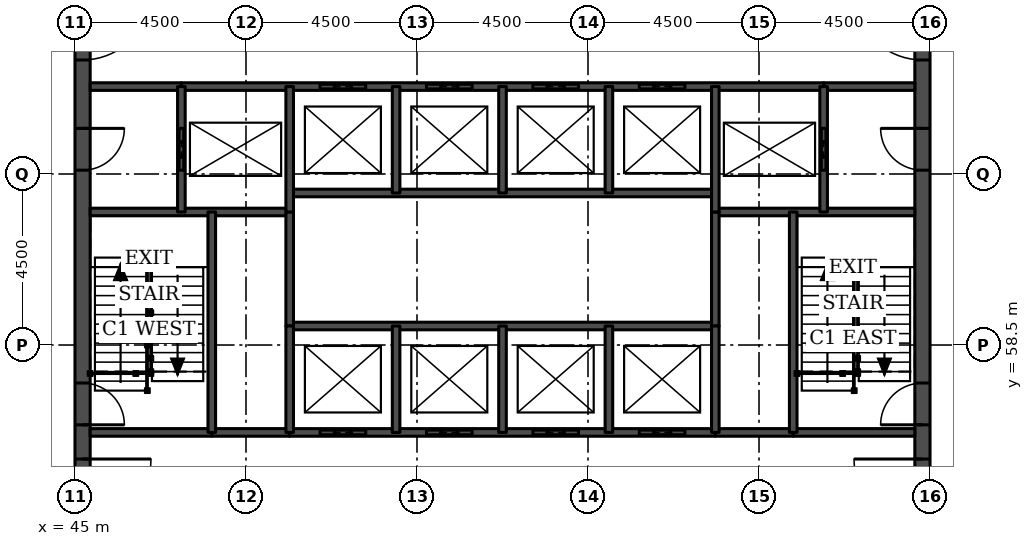
"""IFC4 building model, lengths in metres.
Left out: names, types, materials, properties, quantities, classifications, styles, units other than length and angle.
Written with IfcOpenShell. Run it as: python <this file> out.ifc"""

import sys

from ifc_helpers import new_model, si_unit, direction, frame, frame_2d, origin, place, context, subcontext, project, spatial, rectangle, extrude, element, fill, save


model = new_model("IFC4")
c1 = context("Model", 3, precision=1e-05, world=origin(), true_north=direction((0.0, 1.0)))
c2 = subcontext(c1, "Body", "Model", "MODEL_VIEW")
j1 = project(units=[si_unit("LENGTHUNIT", "METRE"), si_unit("PLANEANGLEUNIT", "RADIAN")], contexts=[c1])
p1 = place(None, origin())
s1 = spatial("IfcSite", under=j1, at=p1, CompositionType="ELEMENT")
p2 = place(p1, origin())
s2 = spatial("IfcBuilding", under=s1, at=p2, CompositionType="ELEMENT")
p3 = place(p2, frame((0.0, 0.0, 169.9)))
s3 = spatial("IfcBuildingStorey", under=s2, at=p3, CompositionType="ELEMENT", Elevation=169.9)
p4 = place(p3, frame((45.2, 49.5, 0.0), z_axis=(0.0, 0.0, 1.0), x_axis=(0.0, 1.0, 0.0)))
e1 = element("IfcWall", 1, at=p4, inside=s3, PredefinedType="SHEAR", context=c2, shape_type="SweptSolid", body=[
    extrude(rectangle(XDim=22.5, YDim=0.4, at=frame_2d((11.25, 0.0))), origin(), (0.0, 0.0, 1.0), 3.7),
])
p5 = place(p4, frame((4.2, 0.0, 0.0)))
e2 = element("IfcOpeningElement", 2, at=p5, cuts=e1, PredefinedType="OPENING", context=c2, shape_type="SweptSolid", body=[
    extrude(rectangle(XDim=1.8, YDim=2.1, at=frame_2d((0.9, 1.05))), frame((0.0, 0.21, 0.0), z_axis=(0.0, -1.0, 0.0), x_axis=(1.0, 0.0, 0.0)), (0.0, 0.0, 1.0), 0.42),
])
p6 = place(p4, frame((6.9, 0.0, 0.0)))
e3 = element("IfcOpeningElement", 3, at=p6, cuts=e1, PredefinedType="OPENING", context=c2, shape_type="SweptSolid", body=[
    extrude(rectangle(XDim=1.1, YDim=2.1, at=frame_2d((0.55, 1.05))), frame((0.0, 0.21, 0.0), z_axis=(0.0, -1.0, 0.0), x_axis=(1.0, 0.0, 0.0)), (0.0, 0.0, 1.0), 0.42),
])
p7 = place(p4, frame((13.6, 0.0, 0.0)))
e4 = element("IfcOpeningElement", 4, at=p7, cuts=e1, PredefinedType="OPENING", context=c2, shape_type="SweptSolid", body=[
    extrude(rectangle(XDim=1.1, YDim=2.1, at=frame_2d((0.55, 1.05))), frame((0.0, 0.21, 0.0), z_axis=(0.0, -1.0, 0.0), x_axis=(1.0, 0.0, 0.0)), (0.0, 0.0, 1.0), 0.42),
])
p8 = place(p4, frame((16.5, 0.0, 0.0)))
e5 = element("IfcOpeningElement", 5, at=p8, cuts=e1, PredefinedType="OPENING", context=c2, shape_type="SweptSolid", body=[
    extrude(rectangle(XDim=1.8, YDim=2.1, at=frame_2d((0.9, 1.05))), frame((0.0, 0.21, 0.0), z_axis=(0.0, -1.0, 0.0), x_axis=(1.0, 0.0, 0.0)), (0.0, 0.0, 1.0), 0.42),
])
p9 = place(p3, frame((67.3, 49.5, 0.0), z_axis=(0.0, 0.0, 1.0), x_axis=(0.0, 1.0, 0.0)))
e6 = element("IfcWall", 6, at=p9, inside=s3, PredefinedType="SHEAR", context=c2, shape_type="SweptSolid", body=[
    extrude(rectangle(XDim=22.5, YDim=0.4, at=frame_2d((11.25, 0.0))), origin(), (0.0, 0.0, 1.0), 3.7),
])
p10 = place(p9, frame((4.2, 0.0, 0.0)))
e7 = element("IfcOpeningElement", 7, at=p10, cuts=e6, PredefinedType="OPENING", context=c2, shape_type="SweptSolid", body=[
    extrude(rectangle(XDim=1.8, YDim=2.1, at=frame_2d((0.9, 1.05))), frame((0.0, 0.21, 0.0), z_axis=(0.0, -1.0, 0.0), x_axis=(1.0, 0.0, 0.0)), (0.0, 0.0, 1.0), 0.42),
])
p11 = place(p9, frame((6.9, 0.0, 0.0)))
e8 = element("IfcOpeningElement", 8, at=p11, cuts=e6, PredefinedType="OPENING", context=c2, shape_type="SweptSolid", body=[
    extrude(rectangle(XDim=1.1, YDim=2.1, at=frame_2d((0.55, 1.05))), frame((0.0, 0.21, 0.0), z_axis=(0.0, -1.0, 0.0), x_axis=(1.0, 0.0, 0.0)), (0.0, 0.0, 1.0), 0.42),
])
p12 = place(p9, frame((13.6, 0.0, 0.0)))
e9 = element("IfcOpeningElement", 9, at=p12, cuts=e6, PredefinedType="OPENING", context=c2, shape_type="SweptSolid", body=[
    extrude(rectangle(XDim=1.1, YDim=2.1, at=frame_2d((0.55, 1.05))), frame((0.0, 0.21, 0.0), z_axis=(0.0, -1.0, 0.0), x_axis=(1.0, 0.0, 0.0)), (0.0, 0.0, 1.0), 0.42),
])
p13 = place(p9, frame((16.5, 0.0, 0.0)))
e10 = element("IfcOpeningElement", 10, at=p13, cuts=e6, PredefinedType="OPENING", context=c2, shape_type="SweptSolid", body=[
    extrude(rectangle(XDim=1.8, YDim=2.1, at=frame_2d((0.9, 1.05))), frame((0.0, 0.21, 0.0), z_axis=(0.0, -1.0, 0.0), x_axis=(1.0, 0.0, 0.0)), (0.0, 0.0, 1.0), 0.42),
])
for number, where, z_axis, x_axis in (
    (11, (48.6, 56.2, 0.0), (0.0, 0.0, 1.0), (1.0, 0.0, 0.0)),
    (12, (61.85, 56.2, 0.0), (0.0, 0.0, 1.0), (1.0, 0.0, 0.0)),
):
    element("IfcWall", number, at=place(p3, frame(where, z_axis=z_axis, x_axis=x_axis)), inside=s3, PredefinedType="SOLIDWALL", context=c2, shape_type="SweptSolid", body=[
        extrude(rectangle(XDim=2.05, YDim=0.2, at=frame_2d((1.025, 0.0))), origin(), (0.0, 0.0, 1.0), 3.55),
    ])
p14 = place(p3, frame((45.4, 56.2, 0.0), z_axis=(0.0, 0.0, 1.0), x_axis=(1.0, 0.0, 0.0)))
e13 = element("IfcWall", 13, at=p14, inside=s3, PredefinedType="SOLIDWALL", context=c2, shape_type="SweptSolid", body=[
    extrude(rectangle(XDim=3.2, YDim=0.2, at=frame_2d((1.6, 0.0))), origin(), (0.0, 0.0, 1.0), 3.55),
])
p15 = place(p3, frame((50.65, 56.2, 0.0), z_axis=(0.0, 0.0, 1.0), x_axis=(1.0, 0.0, 0.0)))
e14 = element("IfcWall", 14, at=p15, inside=s3, PredefinedType="SOLIDWALL", context=c2, shape_type="SweptSolid", body=[
    extrude(rectangle(XDim=11.2, YDim=0.2, at=frame_2d((5.6, 0.0))), origin(), (0.0, 0.0, 1.0), 3.55),
])
p16 = place(p15, frame((0.8, 0.0, 0.0)))
e15 = element("IfcOpeningElement", 15, at=p16, cuts=e14, PredefinedType="OPENING", context=c2, shape_type="SweptSolid", body=[
    extrude(rectangle(XDim=1.2, YDim=2.1, at=frame_2d((0.6, 1.05))), frame((0.0, 0.11, 0.0), z_axis=(0.0, -1.0, 0.0), x_axis=(1.0, 0.0, 0.0)), (0.0, 0.0, 1.0), 0.22),
])
p17 = place(p15, frame((3.6, 0.0, 0.0)))
e16 = element("IfcOpeningElement", 16, at=p17, cuts=e14, PredefinedType="OPENING", context=c2, shape_type="SweptSolid", body=[
    extrude(rectangle(XDim=1.2, YDim=2.1, at=frame_2d((0.6, 1.05))), frame((0.0, 0.11, 0.0), z_axis=(0.0, -1.0, 0.0), x_axis=(1.0, 0.0, 0.0)), (0.0, 0.0, 1.0), 0.22),
])
p18 = place(p15, frame((6.4, 0.0, 0.0)))
e17 = element("IfcOpeningElement", 17, at=p18, cuts=e14, PredefinedType="OPENING", context=c2, shape_type="SweptSolid", body=[
    extrude(rectangle(XDim=1.2, YDim=2.1, at=frame_2d((0.6, 1.05))), frame((0.0, 0.11, 0.0), z_axis=(0.0, -1.0, 0.0), x_axis=(1.0, 0.0, 0.0)), (0.0, 0.0, 1.0), 0.22),
])
p19 = place(p15, frame((9.2, 0.0, 0.0)))
e18 = element("IfcOpeningElement", 18, at=p19, cuts=e14, PredefinedType="OPENING", context=c2, shape_type="SweptSolid", body=[
    extrude(rectangle(XDim=1.2, YDim=2.1, at=frame_2d((0.6, 1.05))), frame((0.0, 0.11, 0.0), z_axis=(0.0, -1.0, 0.0), x_axis=(1.0, 0.0, 0.0)), (0.0, 0.0, 1.0), 0.22),
])
p20 = place(p3, frame((63.9, 56.2, 0.0), z_axis=(0.0, 0.0, 1.0), x_axis=(1.0, 0.0, 0.0)))
e19 = element("IfcWall", 19, at=p20, inside=s3, PredefinedType="SOLIDWALL", context=c2, shape_type="SweptSolid", body=[
    extrude(rectangle(XDim=3.2, YDim=0.2, at=frame_2d((1.6, 0.0))), origin(), (0.0, 0.0, 1.0), 3.55),
])
p21 = place(p3, frame((50.65, 59.0, 0.0), z_axis=(0.0, 0.0, 1.0), x_axis=(1.0, 0.0, 0.0)))
e20 = element("IfcWall", 20, at=p21, inside=s3, PredefinedType="SOLIDWALL", context=c2, shape_type="SweptSolid", body=[
    extrude(rectangle(XDim=11.2, YDim=0.2, at=frame_2d((5.6, 0.0))), origin(), (0.0, 0.0, 1.0), 3.7),
])
for number, where, z_axis, x_axis in (
    (21, (45.4, 62.0, 0.0), (0.0, 0.0, 1.0), (1.0, 0.0, 0.0)),
    (22, (61.85, 62.0, 0.0), (0.0, 0.0, 1.0), (1.0, 0.0, 0.0)),
):
    element("IfcWall", number, at=place(p3, frame(where, z_axis=z_axis, x_axis=x_axis)), inside=s3, PredefinedType="SOLIDWALL", context=c2, shape_type="SweptSolid", body=[
        extrude(rectangle(XDim=5.25, YDim=0.2, at=frame_2d((2.625, 0.0))), origin(), (0.0, 0.0, 1.0), 3.55),
    ])
p22 = place(p3, frame((50.65, 62.5, 0.0), z_axis=(0.0, 0.0, 1.0), x_axis=(1.0, 0.0, 0.0)))
e23 = element("IfcWall", 23, at=p22, inside=s3, PredefinedType="SOLIDWALL", context=c2, shape_type="SweptSolid", body=[
    extrude(rectangle(XDim=11.2, YDim=0.2, at=frame_2d((5.6, 0.0))), origin(), (0.0, 0.0, 1.0), 3.7),
])
for number, where, z_axis, x_axis in (
    (24, (45.4, 65.3, 0.0), (0.0, 0.0, 1.0), (1.0, 0.0, 0.0)),
    (25, (64.7, 65.3, 0.0), (0.0, 0.0, 1.0), (1.0, 0.0, 0.0)),
):
    element("IfcWall", number, at=place(p3, frame(where, z_axis=z_axis, x_axis=x_axis)), inside=s3, PredefinedType="SOLIDWALL", context=c2, shape_type="SweptSolid", body=[
        extrude(rectangle(XDim=2.4, YDim=0.2, at=frame_2d((1.2, 0.0))), origin(), (0.0, 0.0, 1.0), 3.55),
    ])
p23 = place(p3, frame((47.8, 65.3, 0.0), z_axis=(0.0, 0.0, 1.0), x_axis=(1.0, 0.0, 0.0)))
e26 = element("IfcWall", 26, at=p23, inside=s3, PredefinedType="SOLIDWALL", context=c2, shape_type="SweptSolid", body=[
    extrude(rectangle(XDim=16.9, YDim=0.2, at=frame_2d((8.45, 0.0))), origin(), (0.0, 0.0, 1.0), 3.55),
])
p24 = place(p23, frame((3.65, 0.0, 0.0)))
e27 = element("IfcOpeningElement", 27, at=p24, cuts=e26, PredefinedType="OPENING", context=c2, shape_type="SweptSolid", body=[
    extrude(rectangle(XDim=1.2, YDim=2.1, at=frame_2d((0.6, 1.05))), frame((0.0, 0.11, 0.0), z_axis=(0.0, -1.0, 0.0), x_axis=(1.0, 0.0, 0.0)), (0.0, 0.0, 1.0), 0.22),
])
p25 = place(p23, frame((6.45, 0.0, 0.0)))
e28 = element("IfcOpeningElement", 28, at=p25, cuts=e26, PredefinedType="OPENING", context=c2, shape_type="SweptSolid", body=[
    extrude(rectangle(XDim=1.2, YDim=2.1, at=frame_2d((0.6, 1.05))), frame((0.0, 0.11, 0.0), z_axis=(0.0, -1.0, 0.0), x_axis=(1.0, 0.0, 0.0)), (0.0, 0.0, 1.0), 0.22),
])
p26 = place(p23, frame((9.25, 0.0, 0.0)))
e29 = element("IfcOpeningElement", 29, at=p26, cuts=e26, PredefinedType="OPENING", context=c2, shape_type="SweptSolid", body=[
    extrude(rectangle(XDim=1.2, YDim=2.1, at=frame_2d((0.6, 1.05))), frame((0.0, 0.11, 0.0), z_axis=(0.0, -1.0, 0.0), x_axis=(1.0, 0.0, 0.0)), (0.0, 0.0, 1.0), 0.22),
])
p27 = place(p23, frame((12.05, 0.0, 0.0)))
e30 = element("IfcOpeningElement", 30, at=p27, cuts=e26, PredefinedType="OPENING", context=c2, shape_type="SweptSolid", body=[
    extrude(rectangle(XDim=1.2, YDim=2.1, at=frame_2d((0.6, 1.05))), frame((0.0, 0.11, 0.0), z_axis=(0.0, -1.0, 0.0), x_axis=(1.0, 0.0, 0.0)), (0.0, 0.0, 1.0), 0.22),
])
p28 = place(p3, frame((47.8, 62.0, 0.0), z_axis=(0.0, 0.0, 1.0), x_axis=(0.0, 1.0, 0.0)))
e31 = element("IfcWall", 31, at=p28, inside=s3, PredefinedType="SOLIDWALL", context=c2, shape_type="SweptSolid", body=[
    extrude(rectangle(XDim=3.3, YDim=0.2, at=frame_2d((1.65, 0.0))), origin(), (0.0, 0.0, 1.0), 3.55),
])
p29 = place(p28, frame((1.1, 0.0, 0.0)))
e32 = element("IfcOpeningElement", 32, at=p29, cuts=e31, PredefinedType="OPENING", context=c2, shape_type="SweptSolid", body=[
    extrude(rectangle(XDim=1.1, YDim=2.1, at=frame_2d((0.55, 1.05))), frame((0.0, 0.11, 0.0), z_axis=(0.0, -1.0, 0.0), x_axis=(1.0, 0.0, 0.0)), (0.0, 0.0, 1.0), 0.22),
])
p30 = place(p3, frame((48.6, 56.2, 0.0), z_axis=(0.0, 0.0, 1.0), x_axis=(0.0, 1.0, 0.0)))
e33 = element("IfcWall", 33, at=p30, inside=s3, PredefinedType="SOLIDWALL", context=c2, shape_type="SweptSolid", body=[
    extrude(rectangle(XDim=5.8, YDim=0.2, at=frame_2d((2.9, 0.0))), origin(), (0.0, 0.0, 1.0), 3.55),
])
p31 = place(p3, frame((50.65, 59.0, 0.0), z_axis=(0.0, 0.0, 1.0), x_axis=(0.0, 1.0, 0.0)))
e34 = element("IfcWall", 34, at=p31, inside=s3, PredefinedType="SOLIDWALL", context=c2, shape_type="SweptSolid", body=[
    extrude(rectangle(XDim=3.0, YDim=0.2, at=frame_2d((1.5, 0.0))), origin(), (0.0, 0.0, 1.0), 3.7),
])
p32 = place(p3, frame((50.65, 56.2, 0.0), z_axis=(0.0, 0.0, 1.0), x_axis=(0.0, 1.0, 0.0)))
e35 = element("IfcWall", 35, at=p32, inside=s3, PredefinedType="SOLIDWALL", context=c2, shape_type="SweptSolid", body=[
    extrude(rectangle(XDim=2.8, YDim=0.2, at=frame_2d((1.4, 0.0))), origin(), (0.0, 0.0, 1.0), 3.55),
])
p33 = place(p3, frame((50.65, 62.0, 0.0), z_axis=(0.0, 0.0, 1.0), x_axis=(0.0, 1.0, 0.0)))
e36 = element("IfcWall", 36, at=p33, inside=s3, PredefinedType="SOLIDWALL", context=c2, shape_type="SweptSolid", body=[
    extrude(rectangle(XDim=3.3, YDim=0.2, at=frame_2d((1.65, 0.0))), origin(), (0.0, 0.0, 1.0), 3.55),
])
for number, where, z_axis, x_axis in (
    (37, (53.45, 56.2, 0.0), (0.0, 0.0, 1.0), (0.0, 1.0, 0.0)),
    (38, (53.45, 62.5, 0.0), (0.0, 0.0, 1.0), (0.0, 1.0, 0.0)),
    (39, (56.25, 56.2, 0.0), (0.0, 0.0, 1.0), (0.0, 1.0, 0.0)),
    (40, (56.25, 62.5, 0.0), (0.0, 0.0, 1.0), (0.0, 1.0, 0.0)),
    (41, (59.05, 56.2, 0.0), (0.0, 0.0, 1.0), (0.0, 1.0, 0.0)),
    (42, (59.05, 62.5, 0.0), (0.0, 0.0, 1.0), (0.0, 1.0, 0.0)),
):
    element("IfcWall", number, at=place(p3, frame(where, z_axis=z_axis, x_axis=x_axis)), inside=s3, PredefinedType="SOLIDWALL", context=c2, shape_type="SweptSolid", body=[
        extrude(rectangle(XDim=2.8, YDim=0.2, at=frame_2d((1.4, 0.0))), origin(), (0.0, 0.0, 1.0), 3.55),
    ])
p34 = place(p3, frame((61.85, 59.0, 0.0), z_axis=(0.0, 0.0, 1.0), x_axis=(0.0, 1.0, 0.0)))
e43 = element("IfcWall", 43, at=p34, inside=s3, PredefinedType="SOLIDWALL", context=c2, shape_type="SweptSolid", body=[
    extrude(rectangle(XDim=3.0, YDim=0.2, at=frame_2d((1.5, 0.0))), origin(), (0.0, 0.0, 1.0), 3.7),
])
p35 = place(p3, frame((61.85, 56.2, 0.0), z_axis=(0.0, 0.0, 1.0), x_axis=(0.0, 1.0, 0.0)))
e44 = element("IfcWall", 44, at=p35, inside=s3, PredefinedType="SOLIDWALL", context=c2, shape_type="SweptSolid", body=[
    extrude(rectangle(XDim=2.8, YDim=0.2, at=frame_2d((1.4, 0.0))), origin(), (0.0, 0.0, 1.0), 3.55),
])
p36 = place(p3, frame((61.85, 62.0, 0.0), z_axis=(0.0, 0.0, 1.0), x_axis=(0.0, 1.0, 0.0)))
e45 = element("IfcWall", 45, at=p36, inside=s3, PredefinedType="SOLIDWALL", context=c2, shape_type="SweptSolid", body=[
    extrude(rectangle(XDim=3.3, YDim=0.2, at=frame_2d((1.65, 0.0))), origin(), (0.0, 0.0, 1.0), 3.55),
])
p37 = place(p3, frame((63.9, 56.2, 0.0), z_axis=(0.0, 0.0, 1.0), x_axis=(0.0, 1.0, 0.0)))
e46 = element("IfcWall", 46, at=p37, inside=s3, PredefinedType="SOLIDWALL", context=c2, shape_type="SweptSolid", body=[
    extrude(rectangle(XDim=5.8, YDim=0.2, at=frame_2d((2.9, 0.0))), origin(), (0.0, 0.0, 1.0), 3.55),
])
p38 = place(p3, frame((64.7, 62.0, 0.0), z_axis=(0.0, 0.0, 1.0), x_axis=(0.0, 1.0, 0.0)))
e47 = element("IfcWall", 47, at=p38, inside=s3, PredefinedType="SOLIDWALL", context=c2, shape_type="SweptSolid", body=[
    extrude(rectangle(XDim=3.3, YDim=0.2, at=frame_2d((1.65, 0.0))), origin(), (0.0, 0.0, 1.0), 3.55),
])
p39 = place(p38, frame((1.1, 0.0, 0.0)))
e48 = element("IfcOpeningElement", 48, at=p39, cuts=e47, PredefinedType="OPENING", context=c2, shape_type="SweptSolid", body=[
    extrude(rectangle(XDim=1.1, YDim=2.1, at=frame_2d((0.55, 1.05))), frame((0.0, 0.11, 0.0), z_axis=(0.0, -1.0, 0.0), x_axis=(1.0, 0.0, 0.0)), (0.0, 0.0, 1.0), 0.22),
])
p40 = place(p16, origin())
e49 = element("IfcDoor", 49, at=p40, inside=s3, OperationType="DOUBLE_DOOR_SLIDING", PredefinedType="DOOR", context=c2, shape_type="SweptSolid", body=[
    extrude(rectangle(XDim=1.2, YDim=2.1, at=frame_2d((0.6, 1.05))), frame((0.0, 0.025, 0.0), z_axis=(0.0, -1.0, 0.0), x_axis=(1.0, 0.0, 0.0)), (0.0, 0.0, 1.0), 0.05),
])
fill(e15, e49)
p41 = place(p17, origin())
e50 = element("IfcDoor", 50, at=p41, inside=s3, OperationType="DOUBLE_DOOR_SLIDING", PredefinedType="DOOR", context=c2, shape_type="SweptSolid", body=[
    extrude(rectangle(XDim=1.2, YDim=2.1, at=frame_2d((0.6, 1.05))), frame((0.0, 0.025, 0.0), z_axis=(0.0, -1.0, 0.0), x_axis=(1.0, 0.0, 0.0)), (0.0, 0.0, 1.0), 0.05),
])
fill(e16, e50)
p42 = place(p18, origin())
e51 = element("IfcDoor", 51, at=p42, inside=s3, OperationType="DOUBLE_DOOR_SLIDING", PredefinedType="DOOR", context=c2, shape_type="SweptSolid", body=[
    extrude(rectangle(XDim=1.2, YDim=2.1, at=frame_2d((0.6, 1.05))), frame((0.0, 0.025, 0.0), z_axis=(0.0, -1.0, 0.0), x_axis=(1.0, 0.0, 0.0)), (0.0, 0.0, 1.0), 0.05),
])
fill(e17, e51)
p43 = place(p19, origin())
e52 = element("IfcDoor", 52, at=p43, inside=s3, OperationType="DOUBLE_DOOR_SLIDING", PredefinedType="DOOR", context=c2, shape_type="SweptSolid", body=[
    extrude(rectangle(XDim=1.2, YDim=2.1, at=frame_2d((0.6, 1.05))), frame((0.0, 0.025, 0.0), z_axis=(0.0, -1.0, 0.0), x_axis=(1.0, 0.0, 0.0)), (0.0, 0.0, 1.0), 0.05),
])
fill(e18, e52)
p44 = place(p24, origin())
e53 = element("IfcDoor", 53, at=p44, inside=s3, OperationType="DOUBLE_DOOR_SLIDING", PredefinedType="DOOR", context=c2, shape_type="SweptSolid", body=[
    extrude(rectangle(XDim=1.2, YDim=2.1, at=frame_2d((0.6, 1.05))), frame((0.0, 0.025, 0.0), z_axis=(0.0, -1.0, 0.0), x_axis=(1.0, 0.0, 0.0)), (0.0, 0.0, 1.0), 0.05),
])
fill(e27, e53)
p45 = place(p25, origin())
e54 = element("IfcDoor", 54, at=p45, inside=s3, OperationType="DOUBLE_DOOR_SLIDING", PredefinedType="DOOR", context=c2, shape_type="SweptSolid", body=[
    extrude(rectangle(XDim=1.2, YDim=2.1, at=frame_2d((0.6, 1.05))), frame((0.0, 0.025, 0.0), z_axis=(0.0, -1.0, 0.0), x_axis=(1.0, 0.0, 0.0)), (0.0, 0.0, 1.0), 0.05),
])
fill(e28, e54)
p46 = place(p26, origin())
e55 = element("IfcDoor", 55, at=p46, inside=s3, OperationType="DOUBLE_DOOR_SLIDING", PredefinedType="DOOR", context=c2, shape_type="SweptSolid", body=[
    extrude(rectangle(XDim=1.2, YDim=2.1, at=frame_2d((0.6, 1.05))), frame((0.0, 0.025, 0.0), z_axis=(0.0, -1.0, 0.0), x_axis=(1.0, 0.0, 0.0)), (0.0, 0.0, 1.0), 0.05),
])
fill(e29, e55)
p47 = place(p27, origin())
e56 = element("IfcDoor", 56, at=p47, inside=s3, OperationType="DOUBLE_DOOR_SLIDING", PredefinedType="DOOR", context=c2, shape_type="SweptSolid", body=[
    extrude(rectangle(XDim=1.2, YDim=2.1, at=frame_2d((0.6, 1.05))), frame((0.0, 0.025, 0.0), z_axis=(0.0, -1.0, 0.0), x_axis=(1.0, 0.0, 0.0)), (0.0, 0.0, 1.0), 0.05),
])
fill(e30, e56)
p48 = place(p29, origin())
e57 = element("IfcDoor", 57, at=p48, inside=s3, OperationType="DOUBLE_DOOR_SLIDING", PredefinedType="DOOR", context=c2, shape_type="SweptSolid", body=[
    extrude(rectangle(XDim=1.1, YDim=2.1, at=frame_2d((0.55, 1.05))), frame((0.0, 0.025, 0.0), z_axis=(0.0, -1.0, 0.0), x_axis=(1.0, 0.0, 0.0)), (0.0, 0.0, 1.0), 0.05),
])
fill(e32, e57)
p49 = place(p39, origin())
e58 = element("IfcDoor", 58, at=p49, inside=s3, OperationType="DOUBLE_DOOR_SLIDING", PredefinedType="DOOR", context=c2, shape_type="SweptSolid", body=[
    extrude(rectangle(XDim=1.1, YDim=2.1, at=frame_2d((0.55, 1.05))), frame((0.0, 0.025, 0.0), z_axis=(0.0, -1.0, 0.0), x_axis=(1.0, 0.0, 0.0)), (0.0, 0.0, 1.0), 0.05),
])
fill(e48, e58)
p50 = place(p5, frame((1.8, 0.0, 0.0), z_axis=(0.0, 0.0, 1.0), x_axis=(-1.0, 0.0, 0.0)))
e59 = element("IfcDoor", 59, at=p50, inside=s3, OperationType="SINGLE_SWING_LEFT", PredefinedType="DOOR", context=c2, shape_type="SweptSolid", body=[
    extrude(rectangle(XDim=1.8, YDim=2.1, at=frame_2d((0.9, 1.05))), frame((0.0, 0.025, 0.0), z_axis=(0.0, -1.0, 0.0), x_axis=(1.0, 0.0, 0.0)), (0.0, 0.0, 1.0), 0.05),
])
fill(e2, e59)
p51 = place(p6, frame((1.1, 0.0, 0.0), z_axis=(0.0, 0.0, 1.0), x_axis=(-1.0, 0.0, 0.0)))
e60 = element("IfcDoor", 60, at=p51, inside=s3, OperationType="SINGLE_SWING_RIGHT", PredefinedType="DOOR", context=c2, shape_type="SweptSolid", body=[
    extrude(rectangle(XDim=1.1, YDim=2.1, at=frame_2d((0.55, 1.05))), frame((0.0, 0.025, 0.0), z_axis=(0.0, -1.0, 0.0), x_axis=(1.0, 0.0, 0.0)), (0.0, 0.0, 1.0), 0.05),
])
fill(e3, e60)
p52 = place(p7, frame((1.1, 0.0, 0.0), z_axis=(0.0, 0.0, 1.0), x_axis=(-1.0, 0.0, 0.0)))
e61 = element("IfcDoor", 61, at=p52, inside=s3, OperationType="SINGLE_SWING_LEFT", PredefinedType="DOOR", context=c2, shape_type="SweptSolid", body=[
    extrude(rectangle(XDim=1.1, YDim=2.1, at=frame_2d((0.55, 1.05))), frame((0.0, 0.025, 0.0), z_axis=(0.0, -1.0, 0.0), x_axis=(1.0, 0.0, 0.0)), (0.0, 0.0, 1.0), 0.05),
])
fill(e4, e61)
p53 = place(p8, frame((1.8, 0.0, 0.0), z_axis=(0.0, 0.0, 1.0), x_axis=(-1.0, 0.0, 0.0)))
e62 = element("IfcDoor", 62, at=p53, inside=s3, OperationType="SINGLE_SWING_LEFT", PredefinedType="DOOR", context=c2, shape_type="SweptSolid", body=[
    extrude(rectangle(XDim=1.8, YDim=2.1, at=frame_2d((0.9, 1.05))), frame((0.0, 0.025, 0.0), z_axis=(0.0, -1.0, 0.0), x_axis=(1.0, 0.0, 0.0)), (0.0, 0.0, 1.0), 0.05),
])
fill(e5, e62)
p54 = place(p10, origin())
e63 = element("IfcDoor", 63, at=p54, inside=s3, OperationType="SINGLE_SWING_RIGHT", PredefinedType="DOOR", context=c2, shape_type="SweptSolid", body=[
    extrude(rectangle(XDim=1.8, YDim=2.1, at=frame_2d((0.9, 1.05))), frame((0.0, 0.025, 0.0), z_axis=(0.0, -1.0, 0.0), x_axis=(1.0, 0.0, 0.0)), (0.0, 0.0, 1.0), 0.05),
])
fill(e7, e63)
p55 = place(p11, origin())
e64 = element("IfcDoor", 64, at=p55, inside=s3, OperationType="SINGLE_SWING_LEFT", PredefinedType="DOOR", context=c2, shape_type="SweptSolid", body=[
    extrude(rectangle(XDim=1.1, YDim=2.1, at=frame_2d((0.55, 1.05))), frame((0.0, 0.025, 0.0), z_axis=(0.0, -1.0, 0.0), x_axis=(1.0, 0.0, 0.0)), (0.0, 0.0, 1.0), 0.05),
])
fill(e8, e64)
p56 = place(p12, origin())
e65 = element("IfcDoor", 65, at=p56, inside=s3, OperationType="SINGLE_SWING_RIGHT", PredefinedType="DOOR", context=c2, shape_type="SweptSolid", body=[
    extrude(rectangle(XDim=1.1, YDim=2.1, at=frame_2d((0.55, 1.05))), frame((0.0, 0.025, 0.0), z_axis=(0.0, -1.0, 0.0), x_axis=(1.0, 0.0, 0.0)), (0.0, 0.0, 1.0), 0.05),
])
fill(e9, e65)
p57 = place(p13, origin())
e66 = element("IfcDoor", 66, at=p57, inside=s3, OperationType="SINGLE_SWING_RIGHT", PredefinedType="DOOR", context=c2, shape_type="SweptSolid", body=[
    extrude(rectangle(XDim=1.8, YDim=2.1, at=frame_2d((0.9, 1.05))), frame((0.0, 0.025, 0.0), z_axis=(0.0, -1.0, 0.0), x_axis=(1.0, 0.0, 0.0)), (0.0, 0.0, 1.0), 0.05),
])
fill(e10, e66)
save(model, sys.argv[1])
